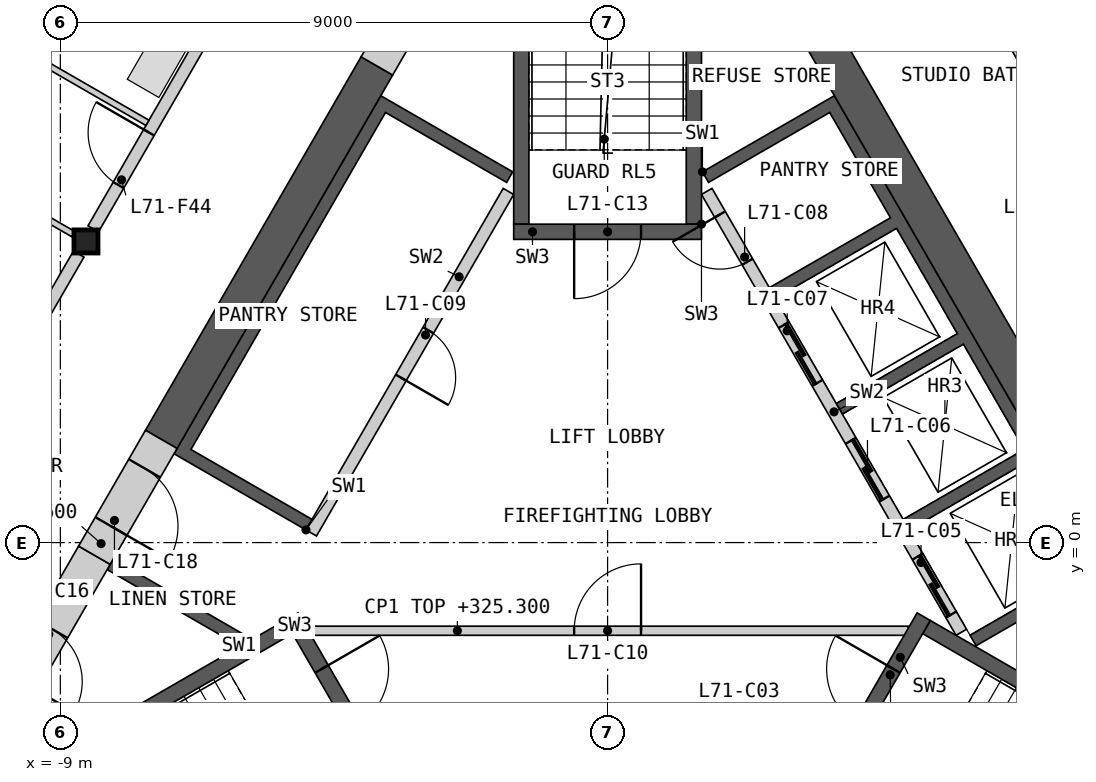
"""IFC4 building model, lengths in metres.
Left out: names, types, materials, properties, quantities, classifications, styles, units other than length and angle.
Written with IfcOpenShell. Run it as: python <this file> out.ifc"""

import sys

from ifc_helpers import new_model, si_unit, direction, frame, frame_2d, origin, origin_2d, place, context, subcontext, project, spatial, polyline, rectangle, i_section, outline, extrude, element, fill, save


model = new_model("IFC4")
c1 = context("Model", 3, precision=1e-05, world=origin(), true_north=direction((0.0, 1.0)))
c2 = subcontext(c1, "Body", "Model", "MODEL_VIEW")
j1 = project(units=[si_unit("LENGTHUNIT", "METRE"), si_unit("PLANEANGLEUNIT", "RADIAN")], contexts=[c1])
p1 = place(None, origin())
s1 = spatial("IfcSite", under=j1, at=p1, CompositionType="ELEMENT")
p2 = place(p1, origin())
s2 = spatial("IfcBuilding", under=s1, at=p2, CompositionType="ELEMENT")
p3 = place(p2, frame((0.0, 0.0, 322.2)))
s3 = spatial("IfcBuildingStorey", under=s2, at=p3, CompositionType="ELEMENT", Elevation=322.2)
p4 = place(p3, frame((-8.578, 4.953, 0.0), z_axis=(0.0, 0.0, 1.0), x_axis=(1.0, 0.0, 0.0)))
e1 = element("IfcColumn", 1, at=p4, inside=s3, PredefinedType="COLUMN", context=c2, shape_type="SweptSolid", body=[
    extrude(i_section(OverallWidth=0.396, OverallDepth=0.381, WebThickness=0.019, FlangeThickness=0.03, at=origin_2d()), origin(), (0.0, 0.0, 1.0), 3.4),
])
p5 = place(p3, origin())
e2 = element("IfcWall", 2, at=p5, inside=s3, PredefinedType="SHEAR", context=c2, shape_type="SweptSolid", body=[
    extrude(outline(polyline([(1.561, 6.097), (3.731, 7.35), (8.231, -0.444), (6.061, -1.697), (5.96, -1.524), (7.952, -0.374), (6.952, 1.358), (4.96, 0.208), (4.861, 0.381), (6.852, 1.531), (5.852, 3.263), (3.861, 2.113), (3.76, 2.287), (5.752, 3.437), (4.752, 5.169), (2.76, 4.019), (2.66, 4.192), (4.652, 5.342), (3.652, 7.074), (1.66, 5.924), (1.561, 6.097)])), origin(), (0.0, 0.0, 1.0), 3.1),
])
p6 = place(p3, frame((5.817, -1.476, 0.0), z_axis=(0.0, 0.0, 1.0), x_axis=(-0.500002616675, 0.866023893041, 0.0)))
e3 = element("IfcWall", 3, at=p6, inside=s3, PredefinedType="SOLIDWALL", context=c2, shape_type="SweptSolid", body=[
    extrude(rectangle(XDim=8.373, YDim=0.2, at=frame_2d((4.187, 0.0))), origin(), (0.0, 0.0, 1.0), 3.1),
])
p7 = place(p6, frame((0.337, 0.0, 0.0)))
e4 = element("IfcOpeningElement", 4, at=p7, cuts=e3, PredefinedType="OPENING", context=c2, shape_type="SweptSolid", body=[
    extrude(rectangle(XDim=1.1, YDim=2.1, at=frame_2d((0.55, 1.05))), frame((0.0, 0.11, 0.0), z_axis=(0.0, -1.0, 0.0), x_axis=(1.0, 0.0, 0.0)), (0.0, 0.0, 1.0), 0.22),
])
p8 = place(p6, frame((2.537, 0.0, 0.0)))
e5 = element("IfcOpeningElement", 5, at=p8, cuts=e3, PredefinedType="OPENING", context=c2, shape_type="SweptSolid", body=[
    extrude(rectangle(XDim=1.1, YDim=2.1, at=frame_2d((0.55, 1.05))), frame((0.0, 0.11, 0.0), z_axis=(0.0, -1.0, 0.0), x_axis=(1.0, 0.0, 0.0)), (0.0, 0.0, 1.0), 0.22),
])
p9 = place(p6, frame((4.737, 0.0, 0.0)))
e6 = element("IfcOpeningElement", 6, at=p9, cuts=e3, PredefinedType="OPENING", context=c2, shape_type="SweptSolid", body=[
    extrude(rectangle(XDim=1.1, YDim=2.1, at=frame_2d((0.55, 1.05))), frame((0.0, 0.11, 0.0), z_axis=(0.0, -1.0, 0.0), x_axis=(1.0, 0.0, 0.0)), (0.0, 0.0, 1.0), 0.22),
])
p10 = place(p6, frame((7.037, 0.0, 0.0)))
e7 = element("IfcOpeningElement", 7, at=p10, cuts=e3, PredefinedType="OPENING", context=c2, shape_type="SweptSolid", body=[
    extrude(rectangle(XDim=0.9, YDim=2.1, at=frame_2d((0.45, 1.05))), frame((0.0, 0.11, 0.0), z_axis=(0.0, -1.0, 0.0), x_axis=(1.0, 0.0, 0.0)), (0.0, 0.0, 1.0), 0.22),
])
p11 = place(p3, origin())
e8 = element("IfcWall", 8, at=p11, inside=s3, PredefinedType="SHEAR", context=c2, shape_type="SweptSolid", body=[
    extrude(outline(polyline([(-6.061, -1.697), (-8.231, -0.444), (-8.131, -0.271), (-5.96, -1.524), (-6.061, -1.697)])), origin(), (0.0, 0.0, 1.0), 3.1),
])
p12 = place(p3, origin())
e9 = element("IfcWall", 9, at=p12, inside=s3, PredefinedType="SHEAR", context=c2, shape_type="SweptSolid", body=[
    extrude(outline(polyline([(-4.96, 0.208), (-7.131, 1.461), (-3.731, 7.35), (-1.561, 6.097), (-1.66, 5.924), (-3.652, 7.074), (-6.852, 1.531), (-4.861, 0.381), (-4.96, 0.208)])), origin(), (0.0, 0.0, 1.0), 3.1),
])
p13 = place(p3, frame((-1.631, 5.776, 0.0), z_axis=(0.0, 0.0, 1.0), x_axis=(-0.499992876559, -0.866029516466, 0.0)))
e10 = element("IfcWall", 10, at=p13, inside=s3, PredefinedType="SOLIDWALL", context=c2, shape_type="SweptSolid", body=[
    extrude(rectangle(XDim=6.486, YDim=0.2, at=frame_2d((3.243, 0.0))), origin(), (0.0, 0.0, 1.0), 3.1),
])
p14 = place(p13, frame((2.637, 0.0, 0.0)))
e11 = element("IfcOpeningElement", 11, at=p14, cuts=e10, PredefinedType="OPENING", context=c2, shape_type="SweptSolid", body=[
    extrude(rectangle(XDim=0.9, YDim=2.1, at=frame_2d((0.45, 1.05))), frame((0.0, 0.11, 0.0), z_axis=(0.0, -1.0, 0.0), x_axis=(1.0, 0.0, 0.0)), (0.0, 0.0, 1.0), 0.22),
])
p15 = place(p3, frame((-4.941, -1.45, 0.0), z_axis=(0.0, 0.0, 1.0), x_axis=(1.0, 0.0, 0.0)))
e12 = element("IfcWall", 12, at=p15, inside=s3, PredefinedType="PARTITIONING", context=c2, shape_type="SweptSolid", body=[
    extrude(rectangle(XDim=9.882, YDim=0.15, at=frame_2d((4.941, 0.0))), origin(), (0.0, 0.0, 1.0), 3.1),
])
p16 = place(p15, frame((4.391, 0.0, 0.0)))
e13 = element("IfcOpeningElement", 13, at=p16, cuts=e12, PredefinedType="OPENING", context=c2, shape_type="SweptSolid", body=[
    extrude(rectangle(XDim=1.1, YDim=2.1, at=frame_2d((0.55, 1.05))), frame((0.0, 0.085, 0.0), z_axis=(0.0, -1.0, 0.0), x_axis=(1.0, 0.0, 0.0)), (0.0, 0.0, 1.0), 0.17),
])
p17 = place(p3, origin())
e14 = element("IfcWall", 14, at=p17, inside=s3, PredefinedType="SHEAR", context=c2, shape_type="SweptSolid", body=[
    extrude(outline(polyline([(-5.307, -1.281), (-10.374, -4.206), (-10.032, -4.298), (-5.182, -1.498), (-5.307, -1.281)])), origin(), (0.0, 0.0, 1.0), 3.1),
])
p18 = place(p3, frame((-5.199, -1.219, 0.0), z_axis=(0.0, 0.0, 1.0), x_axis=(0.499982516597, -0.866035497597, 0.0)))
e15 = element("IfcWall", 15, at=p18, inside=s3, PredefinedType="SHEAR", context=c2, shape_type="SweptSolid", body=[
    extrude(rectangle(XDim=3.088, YDim=0.25, at=frame_2d((1.544, 0.0))), origin(), (0.0, 0.0, 1.0), 3.1),
])
p19 = place(p18, frame((0.994, 0.0, 0.0)))
e16 = element("IfcOpeningElement", 16, at=p19, cuts=e15, PredefinedType="OPENING", context=c2, shape_type="SweptSolid", body=[
    extrude(rectangle(XDim=1.1, YDim=2.1, at=frame_2d((0.55, 1.05))), frame((0.0, 0.135, 0.0), z_axis=(0.0, -1.0, 0.0), x_axis=(1.0, 0.0, 0.0)), (0.0, 0.0, 1.0), 0.27),
])
p20 = place(p3, origin())
e17 = element("IfcWall", 17, at=p20, inside=s3, PredefinedType="SHEAR", context=c2, shape_type="SweptSolid", body=[
    extrude(outline(polyline([(10.032, -4.298), (10.374, -4.206), (5.307, -1.281), (5.182, -1.498), (10.032, -4.298)])), origin(), (0.0, 0.0, 1.0), 3.1),
])
p21 = place(p3, frame((3.655, -3.893, 0.0), z_axis=(0.0, 0.0, 1.0), x_axis=(0.499982516597, 0.866035497597, 0.0)))
e18 = element("IfcWall", 18, at=p21, inside=s3, PredefinedType="SHEAR", context=c2, shape_type="SweptSolid", body=[
    extrude(rectangle(XDim=3.088, YDim=0.25, at=frame_2d((1.544, 0.0))), origin(), (0.0, 0.0, 1.0), 3.1),
])
p22 = place(p21, frame((0.994, 0.0, 0.0)))
e19 = element("IfcOpeningElement", 19, at=p22, cuts=e18, PredefinedType="OPENING", context=c2, shape_type="SweptSolid", body=[
    extrude(rectangle(XDim=1.1, YDim=2.1, at=frame_2d((0.55, 1.05))), frame((0.0, 0.135, 0.0), z_axis=(0.0, -1.0, 0.0), x_axis=(1.0, 0.0, 0.0)), (0.0, 0.0, 1.0), 0.27),
])
p23 = place(p3, origin())
e20 = element("IfcWall", 20, at=p23, inside=s3, PredefinedType="SHEAR", context=c2, shape_type="SweptSolid", body=[
    extrude(outline(polyline([(1.544, 5.237), (1.544, 11.087), (1.294, 10.837), (1.294, 5.237), (1.544, 5.237)])), origin(), (0.0, 0.0, 1.0), 3.1),
])
p24 = place(p3, origin())
e21 = element("IfcWall", 21, at=p24, inside=s3, PredefinedType="SHEAR", context=c2, shape_type="SweptSolid", body=[
    extrude(outline(polyline([(-1.294, 10.837), (-1.544, 11.087), (-1.544, 5.237), (-1.294, 5.237), (-1.294, 10.837)])), origin(), (0.0, 0.0, 1.0), 3.1),
])
p25 = place(p3, frame((1.544, 5.112, 0.0), z_axis=(0.0, 0.0, 1.0), x_axis=(-1.0, 0.0, 0.0)))
e22 = element("IfcWall", 22, at=p25, inside=s3, PredefinedType="SHEAR", context=c2, shape_type="SweptSolid", body=[
    extrude(rectangle(XDim=3.088, YDim=0.25, at=frame_2d((1.544, 0.0))), origin(), (0.0, 0.0, 1.0), 3.1),
])
p26 = place(p25, frame((0.994, 0.0, 0.0)))
e23 = element("IfcOpeningElement", 23, at=p26, cuts=e22, PredefinedType="OPENING", context=c2, shape_type="SweptSolid", body=[
    extrude(rectangle(XDim=1.1, YDim=2.1, at=frame_2d((0.55, 1.05))), frame((0.0, 0.135, 0.0), z_axis=(0.0, -1.0, 0.0), x_axis=(1.0, 0.0, 0.0)), (0.0, 0.0, 1.0), 0.27),
])
p27 = place(p3, frame((8.686, -0.634, 0.0), z_axis=(0.0, 0.0, 1.0), x_axis=(-0.500004601921, 0.866022746848, 0.0)))
e24 = element("IfcWall", 24, at=p27, inside=s3, PredefinedType="SHEAR", context=c2, shape_type="SweptSolid", body=[
    extrude(rectangle(XDim=16.853, YDim=0.6, at=frame_2d((8.426, 0.0))), origin(), (0.0, 0.0, 1.0), 3.1),
])
p28 = place(p3, frame((-3.794, 7.84, 0.0), z_axis=(0.0, 0.0, 1.0), x_axis=(-0.499974747889, -0.866039982607, 0.0)))
e25 = element("IfcWall", 25, at=p28, inside=s3, PredefinedType="SHEAR", context=c2, shape_type="SweptSolid", body=[
    extrude(rectangle(XDim=7.092, YDim=0.6, at=frame_2d((3.546, 0.0))), origin(), (0.0, 0.0, 1.0), 3.1),
])
p29 = place(p3, frame((-8.44, -0.208, 0.0), z_axis=(0.0, 0.0, 1.0), x_axis=(-0.499997052475, -0.866027105532, 0.0)))
e26 = element("IfcWall", 26, at=p29, inside=s3, PredefinedType="SHEAR", context=c2, shape_type="SweptSolid", body=[
    extrude(rectangle(XDim=3.001, YDim=0.6, at=frame_2d((1.501, 0.0))), origin(), (0.0, 0.0, 1.0), 3.1),
])
p30 = place(p29, frame((1.4, 0.0, 0.0)))
e27 = element("IfcOpeningElement", 27, at=p30, cuts=e26, PredefinedType="OPENING", context=c2, shape_type="SweptSolid", body=[
    extrude(rectangle(XDim=1.0, YDim=2.1, at=frame_2d((0.5, 1.05))), frame((0.0, 0.31, 0.0), z_axis=(0.0, -1.0, 0.0), x_axis=(1.0, 0.0, 0.0)), (0.0, 0.0, 1.0), 0.62),
])
p31 = place(p3, frame((-2.694, 9.745, 0.0), z_axis=(0.0, 0.0, 1.0), x_axis=(-0.50002983664, -0.866008176907, 0.0)))
e28 = element("IfcWall", 28, at=p31, inside=s3, PredefinedType="SHEAR", context=c2, shape_type="SweptSolid", body=[
    extrude(rectangle(XDim=2.2, YDim=0.6, at=frame_2d((1.1, 0.0))), origin(), (0.0, 0.0, 1.0), 3.1),
])
p32 = place(p31, frame((0.6, 0.0, 0.0)))
e29 = element("IfcOpeningElement", 29, at=p32, cuts=e28, PredefinedType="OPENING", context=c2, shape_type="SweptSolid", body=[
    extrude(rectangle(XDim=1.0, YDim=2.1, at=frame_2d((0.5, 1.05))), frame((0.0, 0.31, 0.0), z_axis=(0.0, -1.0, 0.0), x_axis=(1.0, 0.0, 0.0)), (0.0, 0.0, 1.0), 0.62),
])
p33 = place(p3, frame((-7.34, 1.698, 0.0), z_axis=(0.0, 0.0, 1.0), x_axis=(-0.50002983664, -0.866008176907, 0.0)))
e30 = element("IfcWall", 30, at=p33, inside=s3, PredefinedType="SHEAR", context=c2, shape_type="SweptSolid", body=[
    extrude(rectangle(XDim=2.2, YDim=0.6, at=frame_2d((1.1, 0.0))), origin(), (0.0, 0.0, 1.0), 3.1),
])
p34 = place(p33, frame((0.55, 0.0, 0.0)))
e31 = element("IfcOpeningElement", 31, at=p34, cuts=e30, PredefinedType="OPENING", context=c2, shape_type="SweptSolid", body=[
    extrude(rectangle(XDim=1.1, YDim=2.1, at=frame_2d((0.55, 1.05))), frame((0.0, 0.31, 0.0), z_axis=(0.0, -1.0, 0.0), x_axis=(1.0, 0.0, 0.0)), (0.0, 0.0, 1.0), 0.62),
])
p35 = place(p3, frame((4.409, 12.174, 0.0), z_axis=(0.0, 0.0, 1.0), x_axis=(0.499984266882, -0.866034487114, 0.0)))
e32 = element("IfcWall", 32, at=p35, inside=s3, PredefinedType="PARTITIONING", context=c2, shape_type="SweptSolid", body=[
    extrude(rectangle(XDim=8.099, YDim=0.2, at=frame_2d((4.049, 0.0))), origin(), (0.0, 0.0, 1.0), 3.1),
])
p36 = place(p35, frame((6.269, 0.0, 0.0)))
e33 = element("IfcOpeningElement", 33, at=p36, cuts=e32, PredefinedType="OPENING", context=c2, shape_type="SweptSolid", body=[
    extrude(rectangle(XDim=1.0, YDim=2.1, at=frame_2d((0.5, 1.05))), frame((0.0, 0.11, 0.0), z_axis=(0.0, -1.0, 0.0), x_axis=(1.0, 0.0, 0.0)), (0.0, 0.0, 1.0), 0.22),
])
p37 = place(p35, frame((1.164, 0.0, 0.0)))
e34 = element("IfcOpeningElement", 34, at=p37, cuts=e32, PredefinedType="OPENING", context=c2, shape_type="SweptSolid", body=[
    extrude(rectangle(XDim=1.0, YDim=2.1, at=frame_2d((0.5, 1.05))), frame((0.0, 0.11, 0.0), z_axis=(0.0, -1.0, 0.0), x_axis=(1.0, 0.0, 0.0)), (0.0, 0.0, 1.0), 0.22),
])
p38 = place(p3, frame((-8.458, 5.16, 0.0), z_axis=(0.0, 0.0, 1.0), x_axis=(0.499984266882, 0.866034487114, 0.0)))
e35 = element("IfcWall", 35, at=p38, inside=s3, PredefinedType="PARTITIONING", context=c2, shape_type="SweptSolid", body=[
    extrude(rectangle(XDim=8.099, YDim=0.2, at=frame_2d((4.049, 0.0))), origin(), (0.0, 0.0, 1.0), 3.1),
])
p39 = place(p38, frame((5.935, 0.0, 0.0)))
e36 = element("IfcOpeningElement", 36, at=p39, cuts=e35, PredefinedType="OPENING", context=c2, shape_type="SweptSolid", body=[
    extrude(rectangle(XDim=1.0, YDim=2.1, at=frame_2d((0.5, 1.05))), frame((0.0, 0.11, 0.0), z_axis=(0.0, -1.0, 0.0), x_axis=(1.0, 0.0, 0.0)), (0.0, 0.0, 1.0), 0.22),
])
p40 = place(p38, frame((0.83, 0.0, 0.0)))
e37 = element("IfcOpeningElement", 37, at=p40, cuts=e35, PredefinedType="OPENING", context=c2, shape_type="SweptSolid", body=[
    extrude(rectangle(XDim=1.0, YDim=2.1, at=frame_2d((0.5, 1.05))), frame((0.0, 0.11, 0.0), z_axis=(0.0, -1.0, 0.0), x_axis=(1.0, 0.0, 0.0)), (0.0, 0.0, 1.0), 0.22),
])
p41 = place(p3, frame((-12.748, -2.269, 0.0), z_axis=(0.0, 0.0, 1.0), x_axis=(0.499984266882, 0.866034487114, 0.0)))
e38 = element("IfcWall", 38, at=p41, inside=s3, PredefinedType="PARTITIONING", context=c2, shape_type="SweptSolid", body=[
    extrude(rectangle(XDim=8.099, YDim=0.2, at=frame_2d((4.049, 0.0))), origin(), (0.0, 0.0, 1.0), 3.1),
])
p42 = place(p41, frame((1.164, 0.0, 0.0)))
e39 = element("IfcOpeningElement", 39, at=p42, cuts=e38, PredefinedType="OPENING", context=c2, shape_type="SweptSolid", body=[
    extrude(rectangle(XDim=1.0, YDim=2.1, at=frame_2d((0.5, 1.05))), frame((0.0, 0.11, 0.0), z_axis=(0.0, -1.0, 0.0), x_axis=(1.0, 0.0, 0.0)), (0.0, 0.0, 1.0), 0.22),
])
p43 = place(p3, frame((-19.615, 11.325, 0.0), z_axis=(0.0, 0.0, 1.0), x_axis=(0.86602139559, -0.500006942333, 0.0)))
e40 = element("IfcWall", 40, at=p43, inside=s3, PredefinedType="PARTITIONING", context=c2, shape_type="SweptSolid", body=[
    extrude(rectangle(XDim=12.505, YDim=0.1, at=frame_2d((6.252, 0.0))), origin(), (0.0, 0.0, 1.0), 2.33),
])
p44 = place(p43, frame((6.28, 0.0, 0.0)))
e41 = element("IfcOpeningElement", 41, at=p44, cuts=e40, PredefinedType="OPENING", context=c2, shape_type="SweptSolid", body=[
    extrude(rectangle(XDim=0.95, YDim=2.1, at=frame_2d((0.475, 1.05))), frame((0.0, 0.06, 0.0), z_axis=(0.0, -1.0, 0.0), x_axis=(1.0, 0.0, 0.0)), (0.0, 0.0, 1.0), 0.12),
])
p45 = place(p3, frame((-12.721, 9.878, 0.0), z_axis=(0.0, 0.0, 1.0), x_axis=(0.866027751316, -0.499995933934, 0.0)))
e42 = element("IfcWall", 42, at=p45, inside=s3, PredefinedType="PARTITIONING", context=c2, shape_type="SweptSolid", body=[
    extrude(rectangle(XDim=5.95, YDim=0.1, at=frame_2d((2.975, 0.0))), origin(), (0.0, 0.0, 1.0), 2.33),
])
p46 = place(p45, frame((0.65, 0.0, 0.0)))
e43 = element("IfcOpeningElement", 43, at=p46, cuts=e42, PredefinedType="OPENING", context=c2, shape_type="SweptSolid", body=[
    extrude(rectangle(XDim=0.95, YDim=2.1, at=frame_2d((0.475, 1.05))), frame((0.0, 0.06, 0.0), z_axis=(0.0, -1.0, 0.0), x_axis=(1.0, 0.0, 0.0)), (0.0, 0.0, 1.0), 0.12),
])
p47 = place(p7, origin())
e44 = element("IfcDoor", 44, at=p47, inside=s3, OperationType="SLIDING_TO_LEFT", PredefinedType="DOOR", context=c2, shape_type="SweptSolid", body=[
    extrude(rectangle(XDim=1.1, YDim=2.1, at=frame_2d((0.55, 1.05))), frame((0.0, 0.025, 0.0), z_axis=(0.0, -1.0, 0.0), x_axis=(1.0, 0.0, 0.0)), (0.0, 0.0, 1.0), 0.05),
])
fill(e4, e44)
p48 = place(p8, origin())
e45 = element("IfcDoor", 45, at=p48, inside=s3, OperationType="SLIDING_TO_LEFT", PredefinedType="DOOR", context=c2, shape_type="SweptSolid", body=[
    extrude(rectangle(XDim=1.1, YDim=2.1, at=frame_2d((0.55, 1.05))), frame((0.0, 0.025, 0.0), z_axis=(0.0, -1.0, 0.0), x_axis=(1.0, 0.0, 0.0)), (0.0, 0.0, 1.0), 0.05),
])
fill(e5, e45)
p49 = place(p9, origin())
e46 = element("IfcDoor", 46, at=p49, inside=s3, OperationType="SLIDING_TO_LEFT", PredefinedType="DOOR", context=c2, shape_type="SweptSolid", body=[
    extrude(rectangle(XDim=1.1, YDim=2.1, at=frame_2d((0.55, 1.05))), frame((0.0, 0.025, 0.0), z_axis=(0.0, -1.0, 0.0), x_axis=(1.0, 0.0, 0.0)), (0.0, 0.0, 1.0), 0.05),
])
fill(e6, e46)
p50 = place(p10, origin())
e47 = element("IfcDoor", 47, at=p50, inside=s3, OperationType="SINGLE_SWING_RIGHT", PredefinedType="DOOR", context=c2, shape_type="SweptSolid", body=[
    extrude(rectangle(XDim=0.9, YDim=2.1, at=frame_2d((0.45, 1.05))), frame((0.0, 0.025, 0.0), z_axis=(0.0, -1.0, 0.0), x_axis=(1.0, 0.0, 0.0)), (0.0, 0.0, 1.0), 0.05),
])
fill(e7, e47)
p51 = place(p14, origin())
e48 = element("IfcDoor", 48, at=p51, inside=s3, OperationType="SINGLE_SWING_RIGHT", PredefinedType="DOOR", context=c2, shape_type="SweptSolid", body=[
    extrude(rectangle(XDim=0.9, YDim=2.1, at=frame_2d((0.45, 1.05))), frame((0.0, 0.025, 0.0), z_axis=(0.0, -1.0, 0.0), x_axis=(1.0, 0.0, 0.0)), (0.0, 0.0, 1.0), 0.05),
])
fill(e11, e48)
p52 = place(p16, origin())
e49 = element("IfcDoor", 49, at=p52, inside=s3, OperationType="SINGLE_SWING_RIGHT", PredefinedType="DOOR", context=c2, shape_type="SweptSolid", body=[
    extrude(rectangle(XDim=1.1, YDim=2.1, at=frame_2d((0.55, 1.05))), frame((0.0, 0.025, 0.0), z_axis=(0.0, -1.0, 0.0), x_axis=(1.0, 0.0, 0.0)), (0.0, 0.0, 1.0), 0.05),
])
fill(e13, e49)
p53 = place(p19, origin())
e50 = element("IfcDoor", 50, at=p53, inside=s3, OperationType="SINGLE_SWING_LEFT", PredefinedType="DOOR", context=c2, shape_type="SweptSolid", body=[
    extrude(rectangle(XDim=1.1, YDim=2.1, at=frame_2d((0.55, 1.05))), frame((0.0, 0.025, 0.0), z_axis=(0.0, -1.0, 0.0), x_axis=(1.0, 0.0, 0.0)), (0.0, 0.0, 1.0), 0.05),
])
fill(e16, e50)
p54 = place(p22, origin())
e51 = element("IfcDoor", 51, at=p54, inside=s3, OperationType="SINGLE_SWING_RIGHT", PredefinedType="DOOR", context=c2, shape_type="SweptSolid", body=[
    extrude(rectangle(XDim=1.1, YDim=2.1, at=frame_2d((0.55, 1.05))), frame((0.0, 0.025, 0.0), z_axis=(0.0, -1.0, 0.0), x_axis=(1.0, 0.0, 0.0)), (0.0, 0.0, 1.0), 0.05),
])
fill(e19, e51)
p55 = place(p26, origin())
e52 = element("IfcDoor", 52, at=p55, inside=s3, OperationType="SINGLE_SWING_RIGHT", PredefinedType="DOOR", context=c2, shape_type="SweptSolid", body=[
    extrude(rectangle(XDim=1.1, YDim=2.1, at=frame_2d((0.55, 1.05))), frame((0.0, 0.025, 0.0), z_axis=(0.0, -1.0, 0.0), x_axis=(1.0, 0.0, 0.0)), (0.0, 0.0, 1.0), 0.05),
])
fill(e23, e52)
p56 = place(p30, origin())
e53 = element("IfcDoor", 53, at=p56, inside=s3, OperationType="SINGLE_SWING_RIGHT", PredefinedType="DOOR", context=c2, shape_type="SweptSolid", body=[
    extrude(rectangle(XDim=1.0, YDim=2.1, at=frame_2d((0.5, 1.05))), frame((0.0, 0.055, 0.0), z_axis=(0.0, -1.0, 0.0), x_axis=(1.0, 0.0, 0.0)), (0.0, 0.0, 1.0), 0.05),
])
fill(e27, e53)
p57 = place(p34, origin())
e54 = element("IfcDoor", 54, at=p57, inside=s3, OperationType="SINGLE_SWING_RIGHT", PredefinedType="DOOR", context=c2, shape_type="SweptSolid", body=[
    extrude(rectangle(XDim=1.1, YDim=2.1, at=frame_2d((0.55, 1.05))), frame((0.0, 0.055, 0.0), z_axis=(0.0, -1.0, 0.0), x_axis=(1.0, 0.0, 0.0)), (0.0, 0.0, 1.0), 0.05),
])
fill(e31, e54)
p58 = place(p40, origin())
e55 = element("IfcDoor", 55, at=p58, inside=s3, OperationType="SINGLE_SWING_RIGHT", PredefinedType="DOOR", context=c2, shape_type="SweptSolid", body=[
    extrude(rectangle(XDim=1.0, YDim=2.1, at=frame_2d((0.5, 1.05))), frame((0.0, 0.025, 0.0), z_axis=(0.0, -1.0, 0.0), x_axis=(1.0, 0.0, 0.0)), (0.0, 0.0, 1.0), 0.05),
])
fill(e37, e55)
save(model, sys.argv[1])
